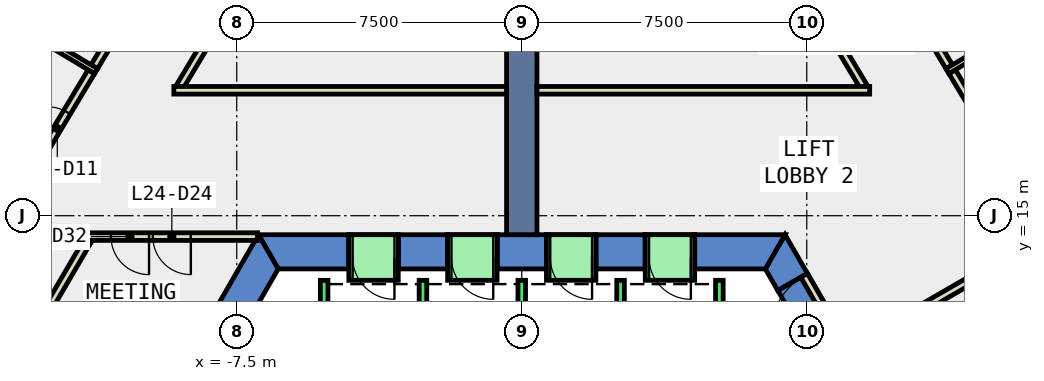
"""IFC4 building model, lengths in metres.
Left out: names, types, materials, properties, quantities, classifications, styles, units other than length and angle.
Written with IfcOpenShell. Run it as: python <this file> out.ifc"""

import sys

from ifc_helpers import new_model, si_unit, direction, frame, frame_2d, origin, place, context, subcontext, project, spatial, polyline, rectangle, outline, extrude, element, fill, save


model = new_model("IFC4")
c1 = context("Model", 3, precision=1e-05, world=origin(), true_north=direction((0.0, 1.0)))
c2 = subcontext(c1, "Body", "Model", "MODEL_VIEW")
j1 = project(units=[si_unit("LENGTHUNIT", "METRE"), si_unit("PLANEANGLEUNIT", "RADIAN")], contexts=[c1])
p1 = place(None, origin())
s1 = spatial("IfcSite", under=j1, at=p1, CompositionType="ELEMENT")
p2 = place(p1, origin())
s2 = spatial("IfcBuilding", under=s1, at=p2, CompositionType="ELEMENT")
p3 = place(p2, frame((0.0, 0.0, 111.8)))
s3 = spatial("IfcBuildingStorey", under=s2, at=p3, CompositionType="ELEMENT", Elevation=111.8)
p4 = place(p3, frame((0.0, 0.0, -0.4)))
e1 = element("IfcWall", 1, at=p4, inside=s3, PredefinedType="SHEAR", context=c2, shape_type="SweptSolid", body=[
    extrude(outline(polyline([(6.738, 13.03), (7.517, 13.48), (6.928, 14.5), (6.409, 13.6), (6.738, 13.03)])), origin(), (0.0, 0.0, 1.0), 4.2),
])
p5 = place(p3, frame((0.0, 0.0, 3.6)))
e2 = element("IfcWall", 2, at=p5, inside=s3, PredefinedType="SHEAR", context=c2, shape_type="SweptSolid", body=[
    extrude(outline(polyline([(7.517, 13.48), (6.738, 13.03), (7.738, 11.298), (8.517, 11.748), (7.517, 13.48)])), origin(), (0.0, 0.0, 1.0), 0.2),
])
p6 = place(p3, frame((0.0, 0.0, -0.4)))
e3 = element("IfcWall", 3, at=p6, inside=s3, PredefinedType="SHEAR", context=c2, shape_type="SweptSolid", body=[
    extrude(outline(polyline([(4.55, 14.5), (4.55, 13.6), (6.409, 13.6), (6.928, 14.5), (4.55, 14.5)])), origin(), (0.0, 0.0, 1.0), 4.2),
])
p7 = place(p3, frame((0.0, 0.0, -0.4)))
e4 = element("IfcWall", 4, at=p7, inside=s3, PredefinedType="SHEAR", context=c2, shape_type="SweptSolid", body=[
    extrude(outline(polyline([(1.95, 14.5), (1.95, 13.6), (3.25, 13.6), (3.25, 14.5), (1.95, 14.5)])), origin(), (0.0, 0.0, 1.0), 4.2),
])
p8 = place(p3, frame((0.0, 0.0, -0.4)))
e5 = element("IfcWall", 5, at=p8, inside=s3, PredefinedType="SHEAR", context=c2, shape_type="SweptSolid", body=[
    extrude(outline(polyline([(-0.65, 14.5), (-0.65, 13.6), (0.65, 13.6), (0.65, 14.5), (-0.65, 14.5)])), origin(), (0.0, 0.0, 1.0), 4.2),
])
p9 = place(p3, frame((0.0, 0.0, -0.4)))
e6 = element("IfcWall", 6, at=p9, inside=s3, PredefinedType="SHEAR", context=c2, shape_type="SweptSolid", body=[
    extrude(outline(polyline([(-3.25, 14.5), (-3.25, 13.6), (-1.95, 13.6), (-1.95, 14.5), (-3.25, 14.5)])), origin(), (0.0, 0.0, 1.0), 4.2),
])
p10 = place(p3, frame((0.0, 0.0, -0.4)))
e7 = element("IfcWall", 7, at=p10, inside=s3, PredefinedType="SHEAR", context=c2, shape_type="SweptSolid", body=[
    extrude(outline(polyline([(-4.55, 13.6), (-4.55, 14.5), (-6.928, 14.5), (-6.409, 13.6), (-4.55, 13.6)])), origin(), (0.0, 0.0, 1.0), 4.2),
])
p11 = place(p3, frame((0.0, 0.0, 3.6)))
e8 = element("IfcWall", 8, at=p11, inside=s3, PredefinedType="SHEAR", context=c2, shape_type="SweptSolid", body=[
    extrude(outline(polyline([(3.25, 14.5), (3.25, 13.6), (4.55, 13.6), (4.55, 14.5), (3.25, 14.5)])), origin(), (0.0, 0.0, 1.0), 0.2),
])
p12 = place(p3, frame((0.0, 0.0, 3.6)))
e9 = element("IfcWall", 9, at=p12, inside=s3, PredefinedType="SHEAR", context=c2, shape_type="SweptSolid", body=[
    extrude(outline(polyline([(0.65, 14.5), (0.65, 13.6), (1.95, 13.6), (1.95, 14.5), (0.65, 14.5)])), origin(), (0.0, 0.0, 1.0), 0.2),
])
p13 = place(p3, frame((0.0, 0.0, 3.6)))
e10 = element("IfcWall", 10, at=p13, inside=s3, PredefinedType="SHEAR", context=c2, shape_type="SweptSolid", body=[
    extrude(outline(polyline([(-1.95, 14.5), (-1.95, 13.6), (-0.65, 13.6), (-0.65, 14.5), (-1.95, 14.5)])), origin(), (0.0, 0.0, 1.0), 0.2),
])
p14 = place(p3, frame((0.0, 0.0, 3.6)))
e11 = element("IfcWall", 11, at=p14, inside=s3, PredefinedType="SHEAR", context=c2, shape_type="SweptSolid", body=[
    extrude(outline(polyline([(-4.55, 14.5), (-4.55, 13.6), (-3.25, 13.6), (-3.25, 14.5), (-4.55, 14.5)])), origin(), (0.0, 0.0, 1.0), 0.2),
])
p15 = place(p3, frame((0.0, 0.0, -0.4)))
e12 = element("IfcWall", 12, at=p15, inside=s3, PredefinedType="SHEAR", context=c2, shape_type="SweptSolid", body=[
    extrude(outline(polyline([(-12.267, 5.252), (-11.488, 4.802), (-6.409, 13.6), (-6.928, 14.5), (-12.267, 5.252)])), origin(), (0.0, 0.0, 1.0), 4.2),
])
p16 = place(p3, frame((0.0, 14.5, -0.4), z_axis=(0.0, 0.0, 1.0), x_axis=(0.0, 1.0, 0.0)))
e13 = element("IfcWall", 13, at=p16, inside=s3, PredefinedType="SHEAR", context=c2, shape_type="SweptSolid", body=[
    extrude(rectangle(XDim=9.0, YDim=0.8, at=frame_2d((4.5, 0.0))), origin(), (0.0, 0.0, 1.0), 4.2),
])
p17 = place(p3, frame((-11.409, 14.364, 0.0), z_axis=(0.0, 0.0, 1.0), x_axis=(-0.504846343003, -0.863209227219, 0.0)))
e14 = element("IfcWall", 14, at=p17, inside=s3, PredefinedType="PARTITIONING", context=c2, shape_type="SweptSolid", body=[
    extrude(rectangle(XDim=2.785, YDim=0.2, at=frame_2d((1.393, 0.0))), origin(), (0.0, 0.0, 1.0), 3.8),
])
p18 = place(p3, frame((11.888, 13.348, 0.0), z_axis=(0.0, 0.0, 1.0), x_axis=(-0.865959227195, -0.500114603702, 0.0)))
e15 = element("IfcWall", 15, at=p18, inside=s3, PredefinedType="PARTITIONING", context=c2, shape_type="SweptSolid", body=[
    extrude(rectangle(XDim=3.269, YDim=0.2, at=frame_2d((1.635, 0.0))), origin(), (0.0, 0.0, 1.0), 3.8),
])
for number, where, z_axis, x_axis in (
    (16, (9.003, 18.386, 0.0), (0.0, 0.0, 1.0), (-0.514, 0.858, 0.0)),
    (17, (-7.576, 20.768, 0.0), (0.0, 0.0, 1.0), (-0.514, -0.858, 0.0)),
):
    element("IfcWall", number, at=place(p3, frame(where, z_axis=z_axis, x_axis=x_axis)), inside=s3, PredefinedType="PARTITIONING", context=c2, shape_type="SweptSolid", body=[
        extrude(rectangle(XDim=2.777, YDim=0.2, at=frame_2d((1.388, 0.0))), origin(), (0.0, 0.0, 1.0), 3.8),
    ])
p19 = place(p3, frame((11.326, 18.79, 0.0), z_axis=(0.0, 0.0, 1.0), x_axis=(0.514155958966, -0.857696712049, 0.0)))
e18 = element("IfcWall", 18, at=p19, inside=s3, PredefinedType="PARTITIONING", context=c2, shape_type="SweptSolid", body=[
    extrude(rectangle(XDim=3.487, YDim=0.2, at=frame_2d((1.744, 0.0))), origin(), (0.0, 0.0, 1.0), 3.8),
])
for number, where, z_axis, x_axis in (
    (19, (9.457, 21.909, 0.0), (0.0, 0.0, 1.0), (0.514, -0.858, 0.0)),
    (20, (-11.249, 18.918, 0.0), (0.0, 0.0, 1.0), (0.514, 0.858, 0.0)),
):
    element("IfcWall", number, at=place(p3, frame(where, z_axis=z_axis, x_axis=x_axis)), inside=s3, PredefinedType="PARTITIONING", context=c2, shape_type="SweptSolid", body=[
        extrude(rectangle(XDim=3.487, YDim=0.2, at=frame_2d((1.743, 0.0))), origin(), (0.0, 0.0, 1.0), 3.8),
    ])
p20 = place(p3, frame((-13.119, 15.799, 0.0), z_axis=(0.0, 0.0, 1.0), x_axis=(0.514155958966, 0.857696712049, 0.0)))
e21 = element("IfcWall", 21, at=p20, inside=s3, PredefinedType="PARTITIONING", context=c2, shape_type="SweptSolid", body=[
    extrude(rectangle(XDim=3.487, YDim=0.2, at=frame_2d((1.744, 0.0))), origin(), (0.0, 0.0, 1.0), 3.8),
])
p21 = place(p20, frame((1.244, 0.0, 0.0)))
e22 = element("IfcOpeningElement", 22, at=p21, cuts=e21, PredefinedType="OPENING", context=c2, shape_type="SweptSolid", body=[
    extrude(rectangle(XDim=1.0, YDim=2.1, at=frame_2d((0.5, 1.05))), frame((0.0, 0.11, 0.0), z_axis=(0.0, -1.0, 0.0), x_axis=(1.0, 0.0, 0.0)), (0.0, 0.0, 1.0), 0.22),
])
p22 = place(p3, frame((-6.957, 14.45, 0.0), z_axis=(0.0, 0.0, 1.0), x_axis=(-1.0, 0.0, 0.0)))
e23 = element("IfcWall", 23, at=p22, inside=s3, PredefinedType="PARTITIONING", context=c2, shape_type="SweptSolid", body=[
    extrude(rectangle(XDim=4.502, YDim=0.2, at=frame_2d((2.251, 0.0))), origin(), (0.0, 0.0, 1.0), 3.8),
])
p23 = place(p22, frame((1.751, 0.0, 0.0)))
e24 = element("IfcOpeningElement", 24, at=p23, cuts=e23, PredefinedType="OPENING", context=c2, shape_type="SweptSolid", body=[
    extrude(rectangle(XDim=1.0, YDim=2.1, at=frame_2d((0.5, 1.05))), frame((0.0, 0.11, 0.0), z_axis=(0.0, -1.0, 0.0), x_axis=(1.0, 0.0, 0.0)), (0.0, 0.0, 1.0), 0.22),
])
p24 = place(p22, frame((2.851, 0.0, 0.0)))
e25 = element("IfcOpeningElement", 25, at=p24, cuts=e23, PredefinedType="OPENING", context=c2, shape_type="SweptSolid", body=[
    extrude(rectangle(XDim=1.0, YDim=2.1, at=frame_2d((0.5, 1.05))), frame((0.0, 0.11, 0.0), z_axis=(0.0, -1.0, 0.0), x_axis=(1.0, 0.0, 0.0)), (0.0, 0.0, 1.0), 0.22),
])
for number, where, z_axis, x_axis in (
    (26, (0.4, 18.3, 0.0), (0.0, 0.0, 1.0), (1.0, 0.0, 0.0)),
    (27, (-9.155, 18.3, 0.0), (0.0, 0.0, 1.0), (1.0, 0.0, 0.0)),
):
    element("IfcWall", number, at=place(p3, frame(where, z_axis=z_axis, x_axis=x_axis)), inside=s3, PredefinedType="PARTITIONING", context=c2, shape_type="SweptSolid", body=[
        extrude(rectangle(XDim=8.755, YDim=0.2, at=frame_2d((4.377, 0.0))), origin(), (0.0, 0.0, 1.0), 3.8),
    ])
for number, where, z_axis, x_axis in (
    (28, (11.202, 18.803, 0.0), (0.0, 0.0, 1.0), (0.858, 0.514, 0.0)),
    (29, (-11.202, 18.803, 0.0), (0.0, 0.0, 1.0), (-0.858, 0.514, 0.0)),
):
    element("IfcWall", number, at=place(p3, frame(where, z_axis=z_axis, x_axis=x_axis)), inside=s3, PredefinedType="PARTITIONING", context=c2, shape_type="SweptSolid", body=[
        extrude(rectangle(XDim=7.7, YDim=0.15, at=frame_2d((3.85, 0.0))), origin(), (0.0, 0.0, 1.0), 3.8),
    ])
p25 = place(p3, frame((8.43, 11.698, 0.0), z_axis=(0.0, 0.0, 1.0), x_axis=(-0.50002537861, 0.866010750942, 0.0)))
e30 = element("IfcWall", 30, at=p25, inside=s3, PredefinedType="PARTITIONING", context=c2, shape_type="SweptSolid", body=[
    extrude(rectangle(XDim=2.0, YDim=0.2, at=frame_2d((1.0, 0.0))), origin(), (0.0, 0.0, 1.0), 2.4),
])
p26 = place(p25, frame((0.19, 0.0, 0.0)))
e31 = element("IfcOpeningElement", 31, at=p26, cuts=e30, PredefinedType="OPENING", context=c2, shape_type="SweptSolid", body=[
    extrude(rectangle(XDim=1.8, YDim=2.1, at=frame_2d((0.9, 1.05))), frame((0.0, 0.11, 0.0), z_axis=(0.0, -1.0, 0.0), x_axis=(1.0, 0.0, 0.0)), (0.0, 0.0, 1.0), 0.22),
])
for number, where, z_axis, x_axis in (
    (32, (5.2, 10.8, 0.0), (0.0, 0.0, 1.0), (0.0, 1.0, 0.0)),
    (33, (2.6, 10.8, 0.0), (0.0, 0.0, 1.0), (0.0, 1.0, 0.0)),
    (34, (0.0, 10.8, 0.0), (0.0, 0.0, 1.0), (0.0, 1.0, 0.0)),
    (35, (-2.6, 10.8, 0.0), (0.0, 0.0, 1.0), (0.0, 1.0, 0.0)),
    (36, (-5.2, 10.8, 0.0), (0.0, 0.0, 1.0), (0.0, 1.0, 0.0)),
):
    element("IfcWall", number, at=place(p3, frame(where, z_axis=z_axis, x_axis=x_axis)), inside=s3, PredefinedType="STANDARD", context=c2, shape_type="SweptSolid", body=[
        extrude(rectangle(XDim=2.5, YDim=0.2, at=frame_2d((1.25, 0.0))), origin(), (0.0, 0.0, 1.0), 3.8),
    ])
p27 = place(p3, frame((4.55, 13.9, 0.0), z_axis=(0.0, 0.0, 1.0), x_axis=(-1.0, 0.0, 0.0)))
e37 = element("IfcWall", 37, at=p27, inside=s3, PredefinedType="STANDARD", context=c2, shape_type="SweptSolid", body=[
    extrude(rectangle(XDim=1.3, YDim=1.2, at=frame_2d((0.65, 0.0))), origin(), (0.0, 0.0, 1.0), 2.4),
])
p28 = place(p27, frame((0.1, 0.0, 0.0)))
e38 = element("IfcOpeningElement", 38, at=p28, cuts=e37, PredefinedType="OPENING", context=c2, shape_type="SweptSolid", body=[
    extrude(rectangle(XDim=1.1, YDim=2.3, at=frame_2d((0.55, 1.15))), frame((0.0, 0.61, 0.0), z_axis=(0.0, -1.0, 0.0), x_axis=(1.0, 0.0, 0.0)), (0.0, 0.0, 1.0), 1.22),
])
p29 = place(p3, frame((1.95, 13.9, 0.0), z_axis=(0.0, 0.0, 1.0), x_axis=(-1.0, 0.0, 0.0)))
e39 = element("IfcWall", 39, at=p29, inside=s3, PredefinedType="STANDARD", context=c2, shape_type="SweptSolid", body=[
    extrude(rectangle(XDim=1.3, YDim=1.2, at=frame_2d((0.65, 0.0))), origin(), (0.0, 0.0, 1.0), 2.4),
])
p30 = place(p29, frame((0.1, 0.0, 0.0)))
e40 = element("IfcOpeningElement", 40, at=p30, cuts=e39, PredefinedType="OPENING", context=c2, shape_type="SweptSolid", body=[
    extrude(rectangle(XDim=1.1, YDim=2.3, at=frame_2d((0.55, 1.15))), frame((0.0, 0.61, 0.0), z_axis=(0.0, -1.0, 0.0), x_axis=(1.0, 0.0, 0.0)), (0.0, 0.0, 1.0), 1.22),
])
p31 = place(p3, frame((-0.65, 13.9, 0.0), z_axis=(0.0, 0.0, 1.0), x_axis=(-1.0, 0.0, 0.0)))
e41 = element("IfcWall", 41, at=p31, inside=s3, PredefinedType="STANDARD", context=c2, shape_type="SweptSolid", body=[
    extrude(rectangle(XDim=1.3, YDim=1.2, at=frame_2d((0.65, 0.0))), origin(), (0.0, 0.0, 1.0), 2.4),
])
p32 = place(p31, frame((0.1, 0.0, 0.0)))
e42 = element("IfcOpeningElement", 42, at=p32, cuts=e41, PredefinedType="OPENING", context=c2, shape_type="SweptSolid", body=[
    extrude(rectangle(XDim=1.1, YDim=2.3, at=frame_2d((0.55, 1.15))), frame((0.0, 0.61, 0.0), z_axis=(0.0, -1.0, 0.0), x_axis=(1.0, 0.0, 0.0)), (0.0, 0.0, 1.0), 1.22),
])
p33 = place(p3, frame((-3.25, 13.9, 0.0), z_axis=(0.0, 0.0, 1.0), x_axis=(-1.0, 0.0, 0.0)))
e43 = element("IfcWall", 43, at=p33, inside=s3, PredefinedType="STANDARD", context=c2, shape_type="SweptSolid", body=[
    extrude(rectangle(XDim=1.3, YDim=1.2, at=frame_2d((0.65, 0.0))), origin(), (0.0, 0.0, 1.0), 2.4),
])
p34 = place(p33, frame((0.1, 0.0, 0.0)))
e44 = element("IfcOpeningElement", 44, at=p34, cuts=e43, PredefinedType="OPENING", context=c2, shape_type="SweptSolid", body=[
    extrude(rectangle(XDim=1.1, YDim=2.3, at=frame_2d((0.55, 1.15))), frame((0.0, 0.61, 0.0), z_axis=(0.0, -1.0, 0.0), x_axis=(1.0, 0.0, 0.0)), (0.0, 0.0, 1.0), 1.22),
])
p35 = place(p21, origin())
e45 = element("IfcDoor", 45, at=p35, inside=s3, OperationType="SINGLE_SWING_LEFT", PredefinedType="DOOR", context=c2, shape_type="SweptSolid", body=[
    extrude(rectangle(XDim=1.0, YDim=2.1, at=frame_2d((0.5, 1.05))), frame((0.0, 0.025, 0.0), z_axis=(0.0, -1.0, 0.0), x_axis=(1.0, 0.0, 0.0)), (0.0, 0.0, 1.0), 0.05),
])
fill(e22, e45)
p36 = place(p23, origin())
e46 = element("IfcDoor", 46, at=p36, inside=s3, OperationType="SINGLE_SWING_LEFT", PredefinedType="DOOR", context=c2, shape_type="SweptSolid", body=[
    extrude(rectangle(XDim=1.0, YDim=2.1, at=frame_2d((0.5, 1.05))), frame((0.0, 0.025, 0.0), z_axis=(0.0, -1.0, 0.0), x_axis=(1.0, 0.0, 0.0)), (0.0, 0.0, 1.0), 0.05),
])
fill(e24, e46)
p37 = place(p24, origin())
e47 = element("IfcDoor", 47, at=p37, inside=s3, OperationType="SINGLE_SWING_RIGHT", PredefinedType="DOOR", context=c2, shape_type="SweptSolid", body=[
    extrude(rectangle(XDim=1.0, YDim=2.1, at=frame_2d((0.5, 1.05))), frame((0.0, 0.025, 0.0), z_axis=(0.0, -1.0, 0.0), x_axis=(1.0, 0.0, 0.0)), (0.0, 0.0, 1.0), 0.05),
])
fill(e25, e47)
p38 = place(p26, origin())
e48 = element("IfcDoor", 48, at=p38, inside=s3, OperationType="DOUBLE_DOOR_SINGLE_SWING", PredefinedType="DOOR", context=c2, shape_type="SweptSolid", body=[
    extrude(rectangle(XDim=1.8, YDim=2.1, at=frame_2d((0.9, 1.05))), frame((0.0, 0.025, 0.0), z_axis=(0.0, -1.0, 0.0), x_axis=(1.0, 0.0, 0.0)), (0.0, 0.0, 1.0), 0.05),
])
fill(e31, e48)
p39 = place(p28, origin())
e49 = element("IfcDoor", 49, at=p39, inside=s3, OperationType="SLIDING_TO_LEFT", PredefinedType="DOOR", context=c2, shape_type="SweptSolid", body=[
    extrude(rectangle(XDim=1.1, YDim=2.3, at=frame_2d((0.55, 1.15))), frame((0.0, 0.025, 0.0), z_axis=(0.0, -1.0, 0.0), x_axis=(1.0, 0.0, 0.0)), (0.0, 0.0, 1.0), 0.05),
])
fill(e38, e49)
p40 = place(p30, origin())
e50 = element("IfcDoor", 50, at=p40, inside=s3, OperationType="SLIDING_TO_LEFT", PredefinedType="DOOR", context=c2, shape_type="SweptSolid", body=[
    extrude(rectangle(XDim=1.1, YDim=2.3, at=frame_2d((0.55, 1.15))), frame((0.0, 0.025, 0.0), z_axis=(0.0, -1.0, 0.0), x_axis=(1.0, 0.0, 0.0)), (0.0, 0.0, 1.0), 0.05),
])
fill(e40, e50)
p41 = place(p32, origin())
e51 = element("IfcDoor", 51, at=p41, inside=s3, OperationType="SLIDING_TO_LEFT", PredefinedType="DOOR", context=c2, shape_type="SweptSolid", body=[
    extrude(rectangle(XDim=1.1, YDim=2.3, at=frame_2d((0.55, 1.15))), frame((0.0, 0.025, 0.0), z_axis=(0.0, -1.0, 0.0), x_axis=(1.0, 0.0, 0.0)), (0.0, 0.0, 1.0), 0.05),
])
fill(e42, e51)
p42 = place(p34, origin())
e52 = element("IfcDoor", 52, at=p42, inside=s3, OperationType="SLIDING_TO_LEFT", PredefinedType="DOOR", context=c2, shape_type="SweptSolid", body=[
    extrude(rectangle(XDim=1.1, YDim=2.3, at=frame_2d((0.55, 1.15))), frame((0.0, 0.025, 0.0), z_axis=(0.0, -1.0, 0.0), x_axis=(1.0, 0.0, 0.0)), (0.0, 0.0, 1.0), 0.05),
])
fill(e44, e52)
save(model, sys.argv[1])
